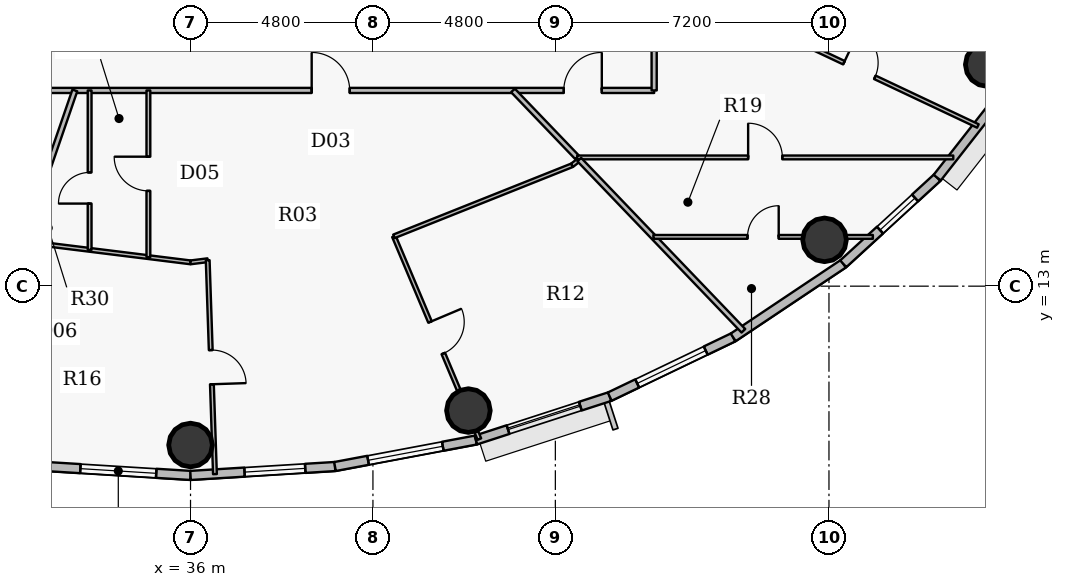
"""IFC4 building model, lengths in metres.
Left out: names, types, materials, properties, quantities, classifications, styles, units other than length and angle.
Written with IfcOpenShell. Run it as: python <this file> out.ifc"""

import sys

from ifc_helpers import new_model, si_unit, direction, frame, frame_2d, origin, origin_2d, place, context, subcontext, project, spatial, rectangle, hollow_circle, extrude, source, transform, mapped, element, fill, save


model = new_model("IFC4")
c1 = context("Model", 3, precision=1e-05, world=origin(), true_north=direction((0.0, 1.0)))
c2 = subcontext(c1, "Body", "Model", "MODEL_VIEW")
j1 = project(units=[si_unit("LENGTHUNIT", "METRE"), si_unit("PLANEANGLEUNIT", "RADIAN")], contexts=[c1])
p1 = place(None, origin())
s1 = spatial("IfcSite", under=j1, at=p1, CompositionType="ELEMENT")
p2 = place(p1, origin())
s2 = spatial("IfcBuilding", under=s1, at=p2, CompositionType="ELEMENT")
p3 = place(p2, frame((0.0, 0.0, 240.3)))
s3 = spatial("IfcBuildingStorey", under=s2, at=p3, CompositionType="ELEMENT", Elevation=240.3)
for number, where, z_axis, x_axis in (
    (1, (36.0, 8.82, 0.0), (0.0, 0.0, 1.0), (1.0, 0.0, 0.0)),
    (2, (43.312, 9.727, 0.0), (0.0, 0.0, 1.0), (1.0, 0.0, 0.0)),
    (3, (52.683, 14.219, 0.0), (0.0, 0.0, 1.0), (1.0, 0.0, 0.0)),
    (4, (56.965, 18.831, 0.0), (0.0, 0.0, 1.0), (1.0, 0.0, 0.0)),
):
    element("IfcColumn", number, at=place(p3, frame(where, z_axis=z_axis, x_axis=x_axis)), inside=s3, PredefinedType="COLUMN", context=c2, shape_type="SweptSolid", body=[
        extrude(hollow_circle(Radius=0.575, WallThickness=0.036, at=origin_2d()), origin(), (0.0, 0.0, 1.0), 3.75),
    ])
p4 = place(p3, frame((36.0, 8.02, 0.0), z_axis=(0.0, 0.0, 1.0), x_axis=(-0.998108785312, 0.06147237333, 0.0)))
e5 = element("IfcWall", 5, at=p4, inside=s3, PredefinedType="SOLIDWALL", context=c2, shape_type="SweptSolid", body=[
    extrude(rectangle(XDim=3.809, YDim=0.24, at=frame_2d((1.904, 0.0))), origin(), (0.0, 0.0, 1.0), 3.5),
])
p5 = place(p4, frame((0.904, 0.0, 0.9)))
e6 = element("IfcOpeningElement", 6, at=p5, cuts=e5, PredefinedType="OPENING", context=c2, shape_type="SweptSolid", body=[
    extrude(rectangle(XDim=2.0, YDim=1.75, at=origin_2d()), frame((1.0, 0.13, 0.875), z_axis=(0.0, -1.0, 0.0), x_axis=(1.0, 0.0, 0.0)), (0.0, 0.0, 1.0), 0.26),
])
p6 = place(p3, frame((39.802, 8.254, 0.0), z_axis=(0.0, 0.0, 1.0), x_axis=(-0.998108785312, -0.06147237333, 0.0)))
e7 = element("IfcWall", 7, at=p6, inside=s3, PredefinedType="SOLIDWALL", context=c2, shape_type="SweptSolid", body=[
    extrude(rectangle(XDim=3.809, YDim=0.24, at=frame_2d((1.904, 0.0))), origin(), (0.0, 0.0, 1.0), 3.5),
])
p7 = place(p6, frame((0.785, 0.0, 0.9)))
e8 = element("IfcOpeningElement", 8, at=p7, cuts=e7, PredefinedType="OPENING", context=c2, shape_type="SweptSolid", body=[
    extrude(rectangle(XDim=1.6, YDim=1.75, at=origin_2d()), frame((0.8, 0.13, 0.875), z_axis=(0.0, -1.0, 0.0), x_axis=(1.0, 0.0, 0.0)), (0.0, 0.0, 1.0), 0.26),
])
p8 = place(p3, frame((43.509, 8.951, 0.0), z_axis=(0.0, 0.0, 1.0), x_axis=(-0.982784898575, -0.184753465822, 0.0)))
e9 = element("IfcWall", 9, at=p8, inside=s3, PredefinedType="SOLIDWALL", context=c2, shape_type="SweptSolid", body=[
    extrude(rectangle(XDim=3.773, YDim=0.24, at=frame_2d((1.886, 0.0))), origin(), (0.0, 0.0, 1.0), 3.5),
])
p9 = place(p8, frame((0.886, 0.0, 0.9)))
e10 = element("IfcOpeningElement", 10, at=p9, cuts=e9, PredefinedType="OPENING", context=c2, shape_type="SweptSolid", body=[
    extrude(rectangle(XDim=2.0, YDim=1.75, at=origin_2d()), frame((1.0, 0.13, 0.875), z_axis=(0.0, -1.0, 0.0), x_axis=(1.0, 0.0, 0.0)), (0.0, 0.0, 1.0), 0.26),
])
p10 = place(p3, frame((47.031, 10.094, 0.0), z_axis=(0.0, 0.0, 1.0), x_axis=(-0.951210789182, -0.308541787354, 0.0)))
e11 = element("IfcWall", 11, at=p10, inside=s3, PredefinedType="SOLIDWALL", context=c2, shape_type="SweptSolid", body=[
    extrude(rectangle(XDim=3.702, YDim=0.24, at=frame_2d((1.851, 0.0))), origin(), (0.0, 0.0, 1.0), 3.5),
])
p11 = place(p10, frame((0.813, 0.0, 0.9)))
e12 = element("IfcOpeningElement", 12, at=p11, cuts=e11, PredefinedType="OPENING", context=c2, shape_type="SweptSolid", body=[
    extrude(rectangle(XDim=2.0, YDim=1.75, at=origin_2d()), frame((1.0, 0.13, 0.875), z_axis=(0.0, -1.0, 0.0), x_axis=(1.0, 0.0, 0.0)), (0.0, 0.0, 1.0), 0.26),
])
p12 = place(p3, frame((50.28, 11.652, 0.0), z_axis=(0.0, 0.0, 1.0), x_axis=(-0.901598104751, -0.432574684313, 0.0)))
e13 = element("IfcWall", 13, at=p12, inside=s3, PredefinedType="SOLIDWALL", context=c2, shape_type="SweptSolid", body=[
    extrude(rectangle(XDim=3.604, YDim=0.24, at=frame_2d((1.802, 0.0))), origin(), (0.0, 0.0, 1.0), 3.5),
])
p13 = place(p12, frame((0.802, 0.0, 0.9)))
e14 = element("IfcOpeningElement", 14, at=p13, cuts=e13, PredefinedType="OPENING", context=c2, shape_type="SweptSolid", body=[
    extrude(rectangle(XDim=2.0, YDim=1.75, at=origin_2d()), frame((1.0, 0.13, 0.875), z_axis=(0.0, -1.0, 0.0), x_axis=(1.0, 0.0, 0.0)), (0.0, 0.0, 1.0), 0.26),
])
p14 = place(p3, frame((53.176, 13.589, 0.0), z_axis=(0.0, 0.0, 1.0), x_axis=(-0.831262496074, -0.555880079352, 0.0)))
e15 = element("IfcWall", 15, at=p14, inside=s3, PredefinedType="SOLIDWALL", context=c2, shape_type="SweptSolid", body=[
    extrude(rectangle(XDim=3.484, YDim=0.24, at=frame_2d((1.742, 0.0))), origin(), (0.0, 0.0, 1.0), 3.5),
])
p15 = place(p3, frame((55.648, 15.855, 0.0), z_axis=(0.0, 0.0, 1.0), x_axis=(-0.737123922599, -0.675757591694, 0.0)))
e16 = element("IfcWall", 16, at=p15, inside=s3, PredefinedType="SOLIDWALL", context=c2, shape_type="SweptSolid", body=[
    extrude(rectangle(XDim=3.354, YDim=0.24, at=frame_2d((1.677, 0.0))), origin(), (0.0, 0.0, 1.0), 3.5),
])
p16 = place(p15, frame((0.791, 0.0, 0.9)))
e17 = element("IfcOpeningElement", 17, at=p16, cuts=e16, PredefinedType="OPENING", context=c2, shape_type="SweptSolid", body=[
    extrude(rectangle(XDim=1.25, YDim=1.65, at=origin_2d()), frame((0.625, 0.13, 0.825), z_axis=(0.0, -1.0, 0.0), x_axis=(1.0, 0.0, 0.0)), (0.0, 0.0, 1.0), 0.26),
])
p17 = place(p3, frame((57.636, 18.395, 0.0), z_axis=(0.0, 0.0, 1.0), x_axis=(-0.616312344705, -0.787501805562, 0.0)))
e18 = element("IfcWall", 18, at=p17, inside=s3, PredefinedType="SOLIDWALL", context=c2, shape_type="SweptSolid", body=[
    extrude(rectangle(XDim=3.225, YDim=0.24, at=frame_2d((1.612, 0.0))), origin(), (0.0, 0.0, 1.0), 3.5),
])
p18 = place(p3, frame((24.35, 18.15, 0.0), z_axis=(0.0, 0.0, 1.0), x_axis=(1.0, 0.0, 0.0)))
e19 = element("IfcWall", 19, at=p18, inside=s3, PredefinedType="PARTITIONING", context=c2, shape_type="SweptSolid", body=[
    extrude(rectangle(XDim=23.85, YDim=0.135, at=frame_2d((11.925, 0.0))), origin(), (0.0, 0.0, 1.0), 2.935),
])
p19 = place(p18, frame((14.838, 0.0, 0.0)))
e20 = element("IfcOpeningElement", 20, at=p19, cuts=e19, PredefinedType="OPENING", context=c2, shape_type="SweptSolid", body=[
    extrude(rectangle(XDim=1.0, YDim=2.15, at=origin_2d()), frame((0.5, 0.078, 1.075), z_axis=(0.0, -1.0, 0.0), x_axis=(1.0, 0.0, 0.0)), (0.0, 0.0, 1.0), 0.155),
])
p20 = place(p18, frame((21.472, 0.0, 0.0)))
e21 = element("IfcOpeningElement", 21, at=p20, cuts=e19, PredefinedType="OPENING", context=c2, shape_type="SweptSolid", body=[
    extrude(rectangle(XDim=1.0, YDim=2.15, at=origin_2d()), frame((0.5, 0.078, 1.075), z_axis=(0.0, -1.0, 0.0), x_axis=(1.0, 0.0, 0.0)), (0.0, 0.0, 1.0), 0.155),
])
p21 = place(p3, frame((29.711, 8.717, 0.0), z_axis=(0.0, 0.0, 1.0), x_axis=(0.325280852175, 0.945617452889, 0.0)))
e22 = element("IfcWall", 22, at=p21, inside=s3, PredefinedType="PARTITIONING", context=c2, shape_type="SweptSolid", body=[
    extrude(rectangle(XDim=9.976, YDim=0.135, at=frame_2d((4.988, 0.0))), origin(), (0.0, 0.0, 1.0), 2.985),
])
p22 = place(p3, frame((30.722, 14.281, 0.0), z_axis=(0.0, 0.0, 1.0), x_axis=(0.992398864395, -0.123062967412, 0.0)))
e23 = element("IfcWall", 23, at=p22, inside=s3, PredefinedType="PARTITIONING", context=c2, shape_type="SweptSolid", body=[
    extrude(rectangle(XDim=5.319, YDim=0.1, at=frame_2d((2.659, 0.0))), origin(), (0.0, 0.0, 1.0), 2.935),
])
p23 = place(p3, frame((33.345, 13.956, 0.0), z_axis=(0.0, 0.0, 1.0), x_axis=(0.0, 1.0, 0.0)))
e24 = element("IfcWall", 24, at=p23, inside=s3, PredefinedType="PARTITIONING", context=c2, shape_type="SweptSolid", body=[
    extrude(rectangle(XDim=4.194, YDim=0.1, at=frame_2d((2.097, 0.0))), origin(), (0.0, 0.0, 1.0), 3.5),
])
p24 = place(p23, frame((1.217, 0.0, 0.0)))
e25 = element("IfcOpeningElement", 25, at=p24, cuts=e24, PredefinedType="OPENING", context=c2, shape_type="SweptSolid", body=[
    extrude(rectangle(XDim=0.82, YDim=2.1, at=origin_2d()), frame((0.41, 0.06, 1.05), z_axis=(0.0, -1.0, 0.0), x_axis=(1.0, 0.0, 0.0)), (0.0, 0.0, 1.0), 0.12),
])
p25 = place(p3, frame((34.891, 13.764, 0.0), z_axis=(0.0, 0.0, 1.0), x_axis=(0.0, 1.0, 0.0)))
e26 = element("IfcWall", 26, at=p25, inside=s3, PredefinedType="PARTITIONING", context=c2, shape_type="SweptSolid", body=[
    extrude(rectangle(XDim=4.386, YDim=0.1, at=frame_2d((2.193, 0.0))), origin(), (0.0, 0.0, 1.0), 3.5),
])
p26 = place(p25, frame((1.743, 0.0, 0.0)))
e27 = element("IfcOpeningElement", 27, at=p26, cuts=e26, PredefinedType="OPENING", context=c2, shape_type="SweptSolid", body=[
    extrude(rectangle(XDim=0.9, YDim=2.1, at=origin_2d()), frame((0.45, 0.06, 1.05), z_axis=(0.0, -1.0, 0.0), x_axis=(1.0, 0.0, 0.0)), (0.0, 0.0, 1.0), 0.12),
])
p27 = place(p3, frame((36.0, 13.626, 0.0), z_axis=(0.0, 0.0, 1.0), x_axis=(0.992368340182, 0.123308869931, 0.0)))
e28 = element("IfcWall", 28, at=p27, inside=s3, PredefinedType="PARTITIONING", context=c2, shape_type="SweptSolid", body=[
    extrude(rectangle(XDim=0.455, YDim=0.1, at=frame_2d((0.228, 0.0))), origin(), (0.0, 0.0, 1.0), 2.935),
])
p28 = place(p3, frame((36.452, 13.683, 0.0), z_axis=(0.0, 0.0, 1.0), x_axis=(0.033903801357, -0.999425100872, 0.0)))
e29 = element("IfcWall", 29, at=p28, inside=s3, PredefinedType="PARTITIONING", context=c2, shape_type="SweptSolid", body=[
    extrude(rectangle(XDim=5.631, YDim=0.1, at=frame_2d((2.815, 0.0))), origin(), (0.0, 0.0, 1.0), 2.985),
])
p29 = place(p28, frame((2.365, 0.0, 0.0)))
e30 = element("IfcOpeningElement", 30, at=p29, cuts=e29, PredefinedType="OPENING", context=c2, shape_type="SweptSolid", body=[
    extrude(rectangle(XDim=0.9, YDim=2.1, at=origin_2d()), frame((0.45, 0.06, 1.05), z_axis=(0.0, -1.0, 0.0), x_axis=(1.0, 0.0, 0.0)), (0.0, 0.0, 1.0), 0.12),
])
p30 = place(p3, frame((41.352, 14.311, 0.0), z_axis=(0.0, 0.0, 1.0), x_axis=(0.388594226314, -0.921408990229, 0.0)))
e31 = element("IfcWall", 31, at=p30, inside=s3, PredefinedType="PARTITIONING", context=c2, shape_type="SweptSolid", body=[
    extrude(rectangle(XDim=5.79, YDim=0.1, at=frame_2d((2.895, 0.0))), origin(), (0.0, 0.0, 1.0), 2.935),
])
p31 = place(p30, frame((2.445, 0.0, 0.0)))
e32 = element("IfcOpeningElement", 32, at=p31, cuts=e31, PredefinedType="OPENING", context=c2, shape_type="SweptSolid", body=[
    extrude(rectangle(XDim=0.9, YDim=2.1, at=origin_2d()), frame((0.45, 0.06, 1.05), z_axis=(0.0, -1.0, 0.0), x_axis=(1.0, 0.0, 0.0)), (0.0, 0.0, 1.0), 0.12),
])
p32 = place(p3, frame((41.352, 14.311, 0.0), z_axis=(0.0, 0.0, 1.0), x_axis=(0.928803297531, 0.370573116261, 0.0)))
e33 = element("IfcWall", 33, at=p32, inside=s3, PredefinedType="PARTITIONING", context=c2, shape_type="SweptSolid", body=[
    extrude(rectangle(XDim=5.047, YDim=0.1, at=frame_2d((2.523, 0.0))), origin(), (0.0, 0.0, 1.0), 2.935),
])
p33 = place(p3, frame((44.485, 18.15, 0.0), z_axis=(0.0, 0.0, 1.0), x_axis=(0.692102956666, -0.72179879286, 0.0)))
e34 = element("IfcWall", 34, at=p33, inside=s3, PredefinedType="PARTITIONING", context=c2, shape_type="SweptSolid", body=[
    extrude(rectangle(XDim=2.442, YDim=0.135, at=frame_2d((1.221, 0.0))), origin(), (0.0, 0.0, 1.0), 3.5),
])
p34 = place(p3, frame((46.039, 16.181, 0.0), z_axis=(0.0, 0.0, 1.0), x_axis=(0.787611392409, 0.616172292909, 0.0)))
e35 = element("IfcWall", 35, at=p34, inside=s3, PredefinedType="PARTITIONING", context=c2, shape_type="SweptSolid", body=[
    extrude(rectangle(XDim=0.242, YDim=0.1, at=frame_2d((0.121, 0.0))), origin(), (0.0, 0.0, 1.0), 3.5),
])
p35 = place(p3, frame((46.175, 16.387, 0.0), z_axis=(0.0, 0.0, 1.0), x_axis=(1.0, 0.0, 0.0)))
e36 = element("IfcWall", 36, at=p35, inside=s3, PredefinedType="PARTITIONING", context=c2, shape_type="SweptSolid", body=[
    extrude(rectangle(XDim=9.896, YDim=0.1, at=frame_2d((4.948, 0.0))), origin(), (0.0, 0.0, 1.0), 2.935),
])
p36 = place(p35, frame((4.498, 0.0, 0.0)))
e37 = element("IfcOpeningElement", 37, at=p36, cuts=e36, PredefinedType="OPENING", context=c2, shape_type="SweptSolid", body=[
    extrude(rectangle(XDim=0.9, YDim=2.1, at=origin_2d()), frame((0.45, 0.06, 1.05), z_axis=(0.0, -1.0, 0.0), x_axis=(1.0, 0.0, 0.0)), (0.0, 0.0, 1.0), 0.12),
])
p37 = place(p3, frame((46.23, 16.33, 0.0), z_axis=(0.0, 0.0, 1.0), x_axis=(0.69206255942, -0.721837525935, 0.0)))
e38 = element("IfcWall", 38, at=p37, inside=s3, PredefinedType="PARTITIONING", context=c2, shape_type="SweptSolid", body=[
    extrude(rectangle(XDim=6.24, YDim=0.135, at=frame_2d((3.12, 0.0))), origin(), (0.0, 0.0, 1.0), 2.985),
])
p38 = place(p3, frame((48.179, 14.297, 0.0), z_axis=(0.0, 0.0, 1.0), x_axis=(1.0, 0.0, 0.0)))
e39 = element("IfcWall", 39, at=p38, inside=s3, PredefinedType="PARTITIONING", context=c2, shape_type="SweptSolid", body=[
    extrude(rectangle(XDim=5.776, YDim=0.1, at=frame_2d((2.888, 0.0))), origin(), (0.0, 0.0, 1.0), 2.935),
])
p39 = place(p38, frame((2.478, 0.0, 0.0)))
e40 = element("IfcOpeningElement", 40, at=p39, cuts=e39, PredefinedType="OPENING", context=c2, shape_type="SweptSolid", body=[
    extrude(rectangle(XDim=0.82, YDim=2.1, at=origin_2d()), frame((0.41, 0.06, 1.05), z_axis=(0.0, -1.0, 0.0), x_axis=(1.0, 0.0, 0.0)), (0.0, 0.0, 1.0), 0.12),
])
p40 = place(p3, frame((48.2, 18.15, 0.0), z_axis=(0.0, 0.0, 1.0), x_axis=(0.0, 1.0, 0.0)))
e41 = element("IfcWall", 41, at=p40, inside=s3, PredefinedType="PARTITIONING", context=c2, shape_type="SweptSolid", body=[
    extrude(rectangle(XDim=1.9, YDim=0.135, at=frame_2d((0.95, 0.0))), origin(), (0.0, 0.0, 1.0), 3.5),
])
p41 = place(p3, frame((50.482, 20.16, 0.0), z_axis=(0.0, 0.0, 1.0), x_axis=(0.904207257568, -0.42709394208, 0.0)))
e42 = element("IfcWall", 42, at=p41, inside=s3, PredefinedType="PARTITIONING", context=c2, shape_type="SweptSolid", body=[
    extrude(rectangle(XDim=6.897, YDim=0.1, at=frame_2d((3.448, 0.0))), origin(), (0.0, 0.0, 1.0), 2.985),
])
p42 = place(p41, frame((2.998, 0.0, 0.0)))
e43 = element("IfcOpeningElement", 43, at=p42, cuts=e42, PredefinedType="OPENING", context=c2, shape_type="SweptSolid", body=[
    extrude(rectangle(XDim=0.9, YDim=2.1, at=origin_2d()), frame((0.45, 0.06, 1.05), z_axis=(0.0, -1.0, 0.0), x_axis=(1.0, 0.0, 0.0)), (0.0, 0.0, 1.0), 0.12),
])
m1 = source(origin(), c2, "Body", "SweptSolid", [
    extrude(rectangle(XDim=2.0, YDim=1.75, at=origin_2d()), frame((1.0, 0.03, 0.875), z_axis=(0.0, -1.0, 0.0), x_axis=(1.0, 0.0, 0.0)), (0.0, 0.0, 1.0), 0.06),
])
p43 = place(p5, origin())
e44 = element("IfcWindow", 44, at=p43, inside=s3, PartitioningType="DOUBLE_PANEL_VERTICAL", PredefinedType="WINDOW", context=c2, shape_type="MappedRepresentation", body=[
    mapped(m1, transform((0.0, 0.0, 0.0), x_axis=(1.0, 0.0, 0.0), y_axis=(0.0, 1.0, 0.0), z_axis=(0.0, 0.0, 1.0), scale=1.0)),
])
fill(e6, e44)
m2 = source(origin(), c2, "Body", "SweptSolid", [
    extrude(rectangle(XDim=1.6, YDim=1.75, at=origin_2d()), frame((0.8, 0.03, 0.875), z_axis=(0.0, -1.0, 0.0), x_axis=(1.0, 0.0, 0.0)), (0.0, 0.0, 1.0), 0.06),
])
p44 = place(p7, origin())
e45 = element("IfcWindow", 45, at=p44, inside=s3, PartitioningType="DOUBLE_PANEL_VERTICAL", PredefinedType="WINDOW", context=c2, shape_type="MappedRepresentation", body=[
    mapped(m2, transform((0.0, 0.0, 0.0), x_axis=(1.0, 0.0, 0.0), y_axis=(0.0, 1.0, 0.0), z_axis=(0.0, 0.0, 1.0), scale=1.0)),
])
fill(e8, e45)
p45 = place(p9, origin())
e46 = element("IfcWindow", 46, at=p45, inside=s3, PartitioningType="DOUBLE_PANEL_VERTICAL", PredefinedType="WINDOW", context=c2, shape_type="MappedRepresentation", body=[
    mapped(m1, transform((0.0, 0.0, 0.0), x_axis=(1.0, 0.0, 0.0), y_axis=(0.0, 1.0, 0.0), z_axis=(0.0, 0.0, 1.0), scale=1.0)),
])
fill(e10, e46)
p46 = place(p11, origin())
e47 = element("IfcWindow", 47, at=p46, inside=s3, PartitioningType="DOUBLE_PANEL_VERTICAL", PredefinedType="WINDOW", context=c2, shape_type="MappedRepresentation", body=[
    mapped(m1, transform((0.0, 0.0, 0.0), x_axis=(1.0, 0.0, 0.0), y_axis=(0.0, 1.0, 0.0), z_axis=(0.0, 0.0, 1.0), scale=1.0)),
])
fill(e12, e47)
p47 = place(p13, origin())
e48 = element("IfcWindow", 48, at=p47, inside=s3, PartitioningType="DOUBLE_PANEL_VERTICAL", PredefinedType="WINDOW", context=c2, shape_type="MappedRepresentation", body=[
    mapped(m1, transform((0.0, 0.0, 0.0), x_axis=(1.0, 0.0, 0.0), y_axis=(0.0, 1.0, 0.0), z_axis=(0.0, 0.0, 1.0), scale=1.0)),
])
fill(e14, e48)
m3 = source(origin(), c2, "Body", "SweptSolid", [
    extrude(rectangle(XDim=1.25, YDim=1.65, at=origin_2d()), frame((0.625, 0.03, 0.825), z_axis=(0.0, -1.0, 0.0), x_axis=(1.0, 0.0, 0.0)), (0.0, 0.0, 1.0), 0.06),
])
p48 = place(p16, origin())
e49 = element("IfcWindow", 49, at=p48, inside=s3, PartitioningType="SINGLE_PANEL", PredefinedType="WINDOW", context=c2, shape_type="MappedRepresentation", body=[
    mapped(m3, transform((0.0, 0.0, 0.0), x_axis=(1.0, 0.0, 0.0), y_axis=(0.0, 1.0, 0.0), z_axis=(0.0, 0.0, 1.0), scale=1.0)),
])
fill(e17, e49)
m4 = source(origin(), c2, "Body", "SweptSolid", [
    extrude(rectangle(XDim=1.0, YDim=2.15, at=origin_2d()), frame((0.5, 0.025, 1.075), z_axis=(0.0, -1.0, 0.0), x_axis=(1.0, 0.0, 0.0)), (0.0, 0.0, 1.0), 0.05),
])
p49 = place(p19, origin())
e50 = element("IfcDoor", 50, at=p49, inside=s3, OperationType="SINGLE_SWING_LEFT", PredefinedType="DOOR", context=c2, shape_type="MappedRepresentation", body=[
    mapped(m4, transform((0.0, 0.0, 0.0), x_axis=(1.0, 0.0, 0.0), y_axis=(0.0, 1.0, 0.0), z_axis=(0.0, 0.0, 1.0), scale=1.0)),
])
fill(e20, e50)
m5 = source(origin(), c2, "Body", "SweptSolid", [
    extrude(rectangle(XDim=0.9, YDim=2.1, at=origin_2d()), frame((0.45, 0.025, 1.05), z_axis=(0.0, -1.0, 0.0), x_axis=(1.0, 0.0, 0.0)), (0.0, 0.0, 1.0), 0.05),
])
p50 = place(p29, origin())
e51 = element("IfcDoor", 51, at=p50, inside=s3, OperationType="SINGLE_SWING_RIGHT", PredefinedType="DOOR", context=c2, shape_type="MappedRepresentation", body=[
    mapped(m5, transform((0.0, 0.0, 0.0), x_axis=(1.0, 0.0, 0.0), y_axis=(0.0, 1.0, 0.0), z_axis=(0.0, 0.0, 1.0), scale=1.0)),
])
fill(e30, e51)
p51 = place(p31, origin())
e52 = element("IfcDoor", 52, at=p51, inside=s3, OperationType="SINGLE_SWING_LEFT", PredefinedType="DOOR", context=c2, shape_type="MappedRepresentation", body=[
    mapped(m5, transform((0.0, 0.0, 0.0), x_axis=(1.0, 0.0, 0.0), y_axis=(0.0, 1.0, 0.0), z_axis=(0.0, 0.0, 1.0), scale=1.0)),
])
fill(e32, e52)
p52 = place(p26, origin())
e53 = element("IfcDoor", 53, at=p52, inside=s3, OperationType="SINGLE_SWING_RIGHT", PredefinedType="DOOR", context=c2, shape_type="MappedRepresentation", body=[
    mapped(m5, transform((0.0, 0.0, 0.0), x_axis=(1.0, 0.0, 0.0), y_axis=(0.0, 1.0, 0.0), z_axis=(0.0, 0.0, 1.0), scale=1.0)),
])
fill(e27, e53)
m6 = source(origin(), c2, "Body", "SweptSolid", [
    extrude(rectangle(XDim=0.82, YDim=2.1, at=origin_2d()), frame((0.41, 0.025, 1.05), z_axis=(0.0, -1.0, 0.0), x_axis=(1.0, 0.0, 0.0)), (0.0, 0.0, 1.0), 0.05),
])
p53 = place(p24, origin())
e54 = element("IfcDoor", 54, at=p53, inside=s3, OperationType="SINGLE_SWING_LEFT", PredefinedType="DOOR", context=c2, shape_type="MappedRepresentation", body=[
    mapped(m6, transform((0.0, 0.0, 0.0), x_axis=(1.0, 0.0, 0.0), y_axis=(0.0, 1.0, 0.0), z_axis=(0.0, 0.0, 1.0), scale=1.0)),
])
fill(e25, e54)
p54 = place(p20, origin())
e55 = element("IfcDoor", 55, at=p54, inside=s3, OperationType="SINGLE_SWING_RIGHT", PredefinedType="DOOR", context=c2, shape_type="MappedRepresentation", body=[
    mapped(m4, transform((0.0, 0.0, 0.0), x_axis=(1.0, 0.0, 0.0), y_axis=(0.0, 1.0, 0.0), z_axis=(0.0, 0.0, 1.0), scale=1.0)),
])
fill(e21, e55)
p55 = place(p42, origin())
e56 = element("IfcDoor", 56, at=p55, inside=s3, OperationType="SINGLE_SWING_LEFT", PredefinedType="DOOR", context=c2, shape_type="MappedRepresentation", body=[
    mapped(m5, transform((0.0, 0.0, 0.0), x_axis=(1.0, 0.0, 0.0), y_axis=(0.0, 1.0, 0.0), z_axis=(0.0, 0.0, 1.0), scale=1.0)),
])
fill(e43, e56)
p56 = place(p36, origin())
e57 = element("IfcDoor", 57, at=p56, inside=s3, OperationType="SINGLE_SWING_LEFT", PredefinedType="DOOR", context=c2, shape_type="MappedRepresentation", body=[
    mapped(m5, transform((0.0, 0.0, 0.0), x_axis=(1.0, 0.0, 0.0), y_axis=(0.0, 1.0, 0.0), z_axis=(0.0, 0.0, 1.0), scale=1.0)),
])
fill(e37, e57)
p57 = place(p39, origin())
e58 = element("IfcDoor", 58, at=p57, inside=s3, OperationType="SINGLE_SWING_RIGHT", PredefinedType="DOOR", context=c2, shape_type="MappedRepresentation", body=[
    mapped(m6, transform((0.0, 0.0, 0.0), x_axis=(1.0, 0.0, 0.0), y_axis=(0.0, 1.0, 0.0), z_axis=(0.0, 0.0, 1.0), scale=1.0)),
])
fill(e40, e58)
save(model, sys.argv[1])
